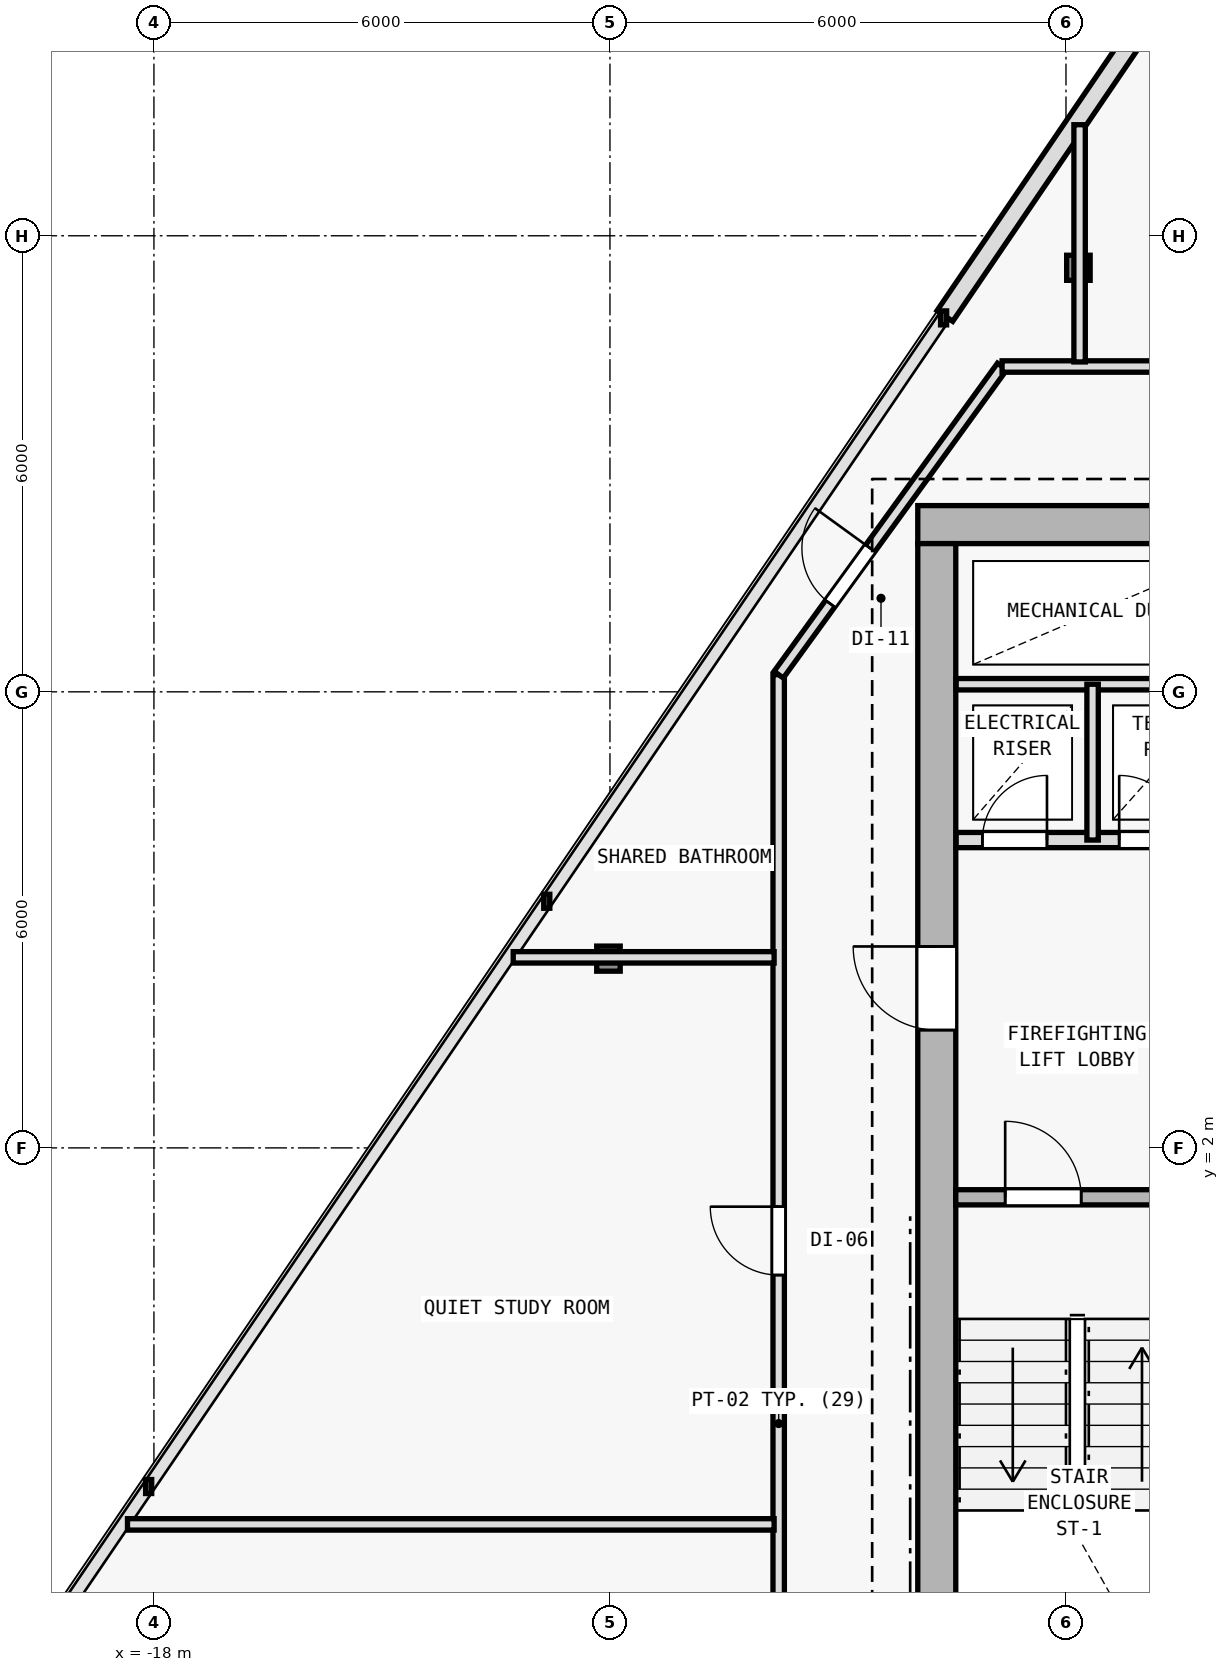
"""IFC4 building model, lengths in metres.
Left out: names, types, materials, properties, quantities, classifications, styles, units other than length and angle.
Written with IfcOpenShell. Run it as: python <this file> out.ifc"""

import sys

from ifc_helpers import new_model, si_unit, direction, frame, frame_2d, origin, origin_2d, place, context, subcontext, project, spatial, rectangle, i_section, extrude, element, fill, save


model = new_model("IFC4")
c1 = context("Model", 3, precision=1e-05, world=origin(), true_north=direction((0.0, 1.0)))
c2 = subcontext(c1, "Body", "Model", "MODEL_VIEW")
j1 = project(units=[si_unit("LENGTHUNIT", "METRE"), si_unit("PLANEANGLEUNIT", "RADIAN")], contexts=[c1])
p1 = place(None, origin())
s1 = spatial("IfcSite", under=j1, at=p1, CompositionType="ELEMENT")
p2 = place(p1, origin())
s2 = spatial("IfcBuilding", under=s1, at=p2, CompositionType="ELEMENT")
p3 = place(p2, frame((0.0, 0.0, 279.6)))
s3 = spatial("IfcBuildingStorey", under=s2, at=p3, CompositionType="ELEMENT", Elevation=279.6)
for number, where, z_axis, x_axis in (
    (1, (-7.7, 10.2, 0.0), (0.0, 0.0, 1.0), (1.0, 0.0, 0.0)),
    (2, (-7.7, 2.0, 0.0), (0.0, 0.0, 1.0), (1.0, 0.0, 0.0)),
):
    element("IfcColumn", number, at=place(p3, frame(where, z_axis=z_axis, x_axis=x_axis)), inside=s3, PredefinedType="COLUMN", context=c2, shape_type="SweptSolid", body=[
        extrude(i_section(OverallWidth=0.374, OverallDepth=0.372, WebThickness=0.012, FlangeThickness=0.02, FilletRadius=0.015, at=origin_2d()), origin(), (0.0, 0.0, 1.0), 3.6),
    ])
p4 = place(p3, frame((-5.837, 13.579, 0.005), z_axis=(0.008774546149, -0.002584750028, 0.999958162328), x_axis=(0.282568886397, 0.959247009086, 0.0)))
e3 = element("IfcColumn", 3, at=p4, inside=s3, PredefinedType="COLUMN", context=c2, shape_type="SweptSolid", body=[
    extrude(i_section(OverallWidth=0.309, OverallDepth=0.33, WebThickness=0.011, FlangeThickness=0.019, FilletRadius=0.027, at=origin_2d()), origin(), (0.0, 0.0, 1.0), 3.589),
])
p5 = place(p3, frame((-12.02, 4.49, 0.005), z_axis=(0.017070406608, 0.009521342331, 0.99980895438), x_axis=(-0.487119351792, 0.873335409284, 0.0)))
e4 = element("IfcColumn", 4, at=p5, inside=s3, PredefinedType="COLUMN", context=c2, shape_type="SweptSolid", body=[
    extrude(i_section(OverallWidth=0.309, OverallDepth=0.33, WebThickness=0.011, FlangeThickness=0.019, FilletRadius=0.027, at=origin_2d()), origin(), (0.0, 0.0, 1.0), 3.59),
])
p6 = place(p3, frame((-7.593, 12.945, 0.0), z_axis=(0.0, 0.0, 1.0), x_axis=(0.562476003565, 0.826813609838, 0.0)))
e5 = element("IfcWall", 5, at=p6, inside=s3, PredefinedType="SOLIDWALL", context=c2, shape_type="SweptSolid", body=[
    extrude(rectangle(XDim=9.816, YDim=0.25, at=frame_2d((4.908, 0.0))), origin(), (0.0, 0.0, 1.0), 3.35),
])
p7 = place(p6, frame((4.358, 0.0, 0.62)))
e6 = element("IfcOpeningElement", 6, at=p7, cuts=e5, PredefinedType="OPENING", context=c2, shape_type="SweptSolid", body=[
    extrude(rectangle(XDim=1.1, YDim=1.8, at=frame_2d((0.55, 0.9))), frame((0.0, 0.135, 0.0), z_axis=(0.0, -1.0, 0.0), x_axis=(1.0, 0.0, 0.0)), (0.0, 0.0, 1.0), 0.27),
])
p8 = place(p3, frame((7.95, 10.2, 0.0), z_axis=(0.0, 0.0, 1.0), x_axis=(-1.0, 0.0, 0.0)))
e7 = element("IfcWall", 7, at=p8, inside=s3, PredefinedType="SHEAR", context=c2, shape_type="SweptSolid", body=[
    extrude(rectangle(XDim=15.9, YDim=0.5, at=frame_2d((7.95, 0.0))), origin(), (0.0, 0.0, 1.0), 3.35),
])
p9 = place(p8, frame((4.4, 0.0, 0.0)))
e8 = element("IfcOpeningElement", 8, at=p9, cuts=e7, PredefinedType="OPENING", context=c2, shape_type="SweptSolid", body=[
    extrude(rectangle(XDim=1.1, YDim=2.15, at=frame_2d((0.55, 1.075))), frame((0.0, 0.26, 0.0), z_axis=(0.0, -1.0, 0.0), x_axis=(1.0, 0.0, 0.0)), (0.0, 0.0, 1.0), 0.52),
])
p10 = place(p3, frame((-7.7, -9.15, 0.0), z_axis=(0.0, 0.0, 1.0), x_axis=(0.0, 1.0, 0.0)))
e9 = element("IfcWall", 9, at=p10, inside=s3, PredefinedType="SHEAR", context=c2, shape_type="SweptSolid", body=[
    extrude(rectangle(XDim=19.1, YDim=0.5, at=frame_2d((9.55, 0.0))), origin(), (0.0, 0.0, 1.0), 3.35),
])
p11 = place(p10, frame((12.7, 0.0, 0.0)))
e10 = element("IfcOpeningElement", 10, at=p11, cuts=e9, PredefinedType="OPENING", context=c2, shape_type="SweptSolid", body=[
    extrude(rectangle(XDim=1.1, YDim=2.15, at=frame_2d((0.55, 1.075))), frame((0.0, 0.26, 0.0), z_axis=(0.0, -1.0, 0.0), x_axis=(1.0, 0.0, 0.0)), (0.0, 0.0, 1.0), 0.52),
])
p12 = place(p3, frame((-7.45, 1.35, 0.0), z_axis=(0.0, 0.0, 1.0), x_axis=(1.0, 0.0, 0.0)))
e11 = element("IfcWall", 11, at=p12, inside=s3, PredefinedType="SOLIDWALL", context=c2, shape_type="SweptSolid", body=[
    extrude(rectangle(XDim=3.4, YDim=0.2, at=frame_2d((1.7, 0.0))), origin(), (0.0, 0.0, 1.0), 3.35),
])
p13 = place(p12, frame((0.65, 0.0, 0.0)))
e12 = element("IfcOpeningElement", 12, at=p13, cuts=e11, PredefinedType="OPENING", context=c2, shape_type="SweptSolid", body=[
    extrude(rectangle(XDim=1.0, YDim=2.15, at=frame_2d((0.5, 1.075))), frame((0.0, 0.11, 0.0), z_axis=(0.0, -1.0, 0.0), x_axis=(1.0, 0.0, 0.0)), (0.0, 0.0, 1.0), 0.22),
])
p14 = place(p3, frame((-7.445, 6.05, 0.0), z_axis=(0.0, 0.0, 1.0), x_axis=(1.0, 0.0, 0.0)))
e13 = element("IfcWall", 13, at=p14, inside=s3, PredefinedType="SOLIDWALL", context=c2, shape_type="SweptSolid", body=[
    extrude(rectangle(XDim=3.595, YDim=0.2, at=frame_2d((1.797, 0.0))), origin(), (0.0, 0.0, 1.0), 3.35),
])
p15 = place(p14, frame((0.345, 0.0, 0.0)))
e14 = element("IfcOpeningElement", 14, at=p15, cuts=e13, PredefinedType="OPENING", context=c2, shape_type="SweptSolid", body=[
    extrude(rectangle(XDim=0.85, YDim=2.1, at=frame_2d((0.425, 1.05))), frame((0.0, 0.11, 0.0), z_axis=(0.0, -1.0, 0.0), x_axis=(1.0, 0.0, 0.0)), (0.0, 0.0, 1.0), 0.22),
])
p16 = place(p14, frame((2.145, 0.0, 0.0)))
e15 = element("IfcOpeningElement", 15, at=p16, cuts=e13, PredefinedType="OPENING", context=c2, shape_type="SweptSolid", body=[
    extrude(rectangle(XDim=0.85, YDim=2.1, at=frame_2d((0.425, 1.05))), frame((0.0, 0.11, 0.0), z_axis=(0.0, -1.0, 0.0), x_axis=(1.0, 0.0, 0.0)), (0.0, 0.0, 1.0), 0.22),
])
p17 = place(p3, frame((-7.445, 8.1, 0.0), z_axis=(0.0, 0.0, 1.0), x_axis=(1.0, 0.0, 0.0)))
e16 = element("IfcWall", 16, at=p17, inside=s3, PredefinedType="PARTITIONING", context=c2, shape_type="SweptSolid", body=[
    extrude(rectangle(XDim=3.595, YDim=0.15, at=frame_2d((1.797, 0.0))), origin(), (0.0, 0.0, 1.0), 3.35),
])
p18 = place(p3, frame((-5.65, 6.05, 0.0), z_axis=(0.0, 0.0, 1.0), x_axis=(0.0, 1.0, 0.0)))
e17 = element("IfcWall", 17, at=p18, inside=s3, PredefinedType="PARTITIONING", context=c2, shape_type="SweptSolid", body=[
    extrude(rectangle(XDim=2.05, YDim=0.15, at=frame_2d((1.025, 0.0))), origin(), (0.0, 0.0, 1.0), 3.35),
])
p19 = place(p3, frame((-9.78, -11.48, 0.0), z_axis=(0.0, 0.0, 1.0), x_axis=(0.0, 1.0, 0.0)))
e18 = element("IfcWall", 18, at=p19, inside=s3, PredefinedType="PARTITIONING", context=c2, shape_type="SweptSolid", body=[
    extrude(rectangle(XDim=19.706, YDim=0.15, at=frame_2d((9.853, 0.0))), origin(), (0.0, 0.0, 1.0), 2.825),
])
p20 = place(p19, frame((11.807, 0.0, 0.0)))
e19 = element("IfcOpeningElement", 19, at=p20, cuts=e18, PredefinedType="OPENING", context=c2, shape_type="SweptSolid", body=[
    extrude(rectangle(XDim=0.9, YDim=2.1, at=frame_2d((0.45, 1.05))), frame((0.0, 0.085, 0.0), z_axis=(0.0, -1.0, 0.0), x_axis=(1.0, 0.0, 0.0)), (0.0, 0.0, 1.0), 0.17),
])
p21 = place(p19, frame((3.903, 0.0, 0.0)))
e20 = element("IfcOpeningElement", 20, at=p21, cuts=e18, PredefinedType="OPENING", context=c2, shape_type="SweptSolid", body=[
    extrude(rectangle(XDim=0.9, YDim=2.1, at=frame_2d((0.45, 1.05))), frame((0.0, 0.085, 0.0), z_axis=(0.0, -1.0, 0.0), x_axis=(1.0, 0.0, 0.0)), (0.0, 0.0, 1.0), 0.17),
])
p22 = place(p3, frame((-9.78, 8.226, 0.0), z_axis=(0.0, 0.0, 1.0), x_axis=(0.586956386413, 0.809618552436, 0.0)))
e21 = element("IfcWall", 21, at=p22, inside=s3, PredefinedType="PARTITIONING", context=c2, shape_type="SweptSolid", body=[
    extrude(rectangle(XDim=5.008, YDim=0.15, at=frame_2d((2.504, 0.0))), origin(), (0.0, 0.0, 1.0), 3.015),
])
p23 = place(p22, frame((1.154, 0.0, 0.0)))
e22 = element("IfcOpeningElement", 22, at=p23, cuts=e21, PredefinedType="OPENING", context=c2, shape_type="SweptSolid", body=[
    extrude(rectangle(XDim=0.9, YDim=2.1, at=frame_2d((0.45, 1.05))), frame((0.0, 0.085, 0.0), z_axis=(0.0, -1.0, 0.0), x_axis=(1.0, 0.0, 0.0)), (0.0, 0.0, 1.0), 0.17),
])
p24 = place(p3, frame((-6.841, 12.28, 0.0), z_axis=(0.0, 0.0, 1.0), x_axis=(1.0, 0.0, 0.0)))
e23 = element("IfcWall", 23, at=p24, inside=s3, PredefinedType="PARTITIONING", context=c2, shape_type="SweptSolid", body=[
    extrude(rectangle(XDim=13.682, YDim=0.15, at=frame_2d((6.841, 0.0))), origin(), (0.0, 0.0, 1.0), 3.015),
])
p25 = place(p24, frame((10.935, 0.0, 0.0)))
e24 = element("IfcOpeningElement", 24, at=p25, cuts=e23, PredefinedType="OPENING", context=c2, shape_type="SweptSolid", body=[
    extrude(rectangle(XDim=0.9, YDim=2.1, at=frame_2d((0.45, 1.05))), frame((0.0, 0.085, 0.0), z_axis=(0.0, -1.0, 0.0), x_axis=(1.0, 0.0, 0.0)), (0.0, 0.0, 1.0), 0.17),
])
p26 = place(p24, frame((4.693, 0.0, 0.0)))
e25 = element("IfcOpeningElement", 25, at=p26, cuts=e23, PredefinedType="OPENING", context=c2, shape_type="SweptSolid", body=[
    extrude(rectangle(XDim=0.9, YDim=2.1, at=frame_2d((0.45, 1.05))), frame((0.0, 0.085, 0.0), z_axis=(0.0, -1.0, 0.0), x_axis=(1.0, 0.0, 0.0)), (0.0, 0.0, 1.0), 0.17),
])
p27 = place(p3, frame((-5.821, 12.34, 0.0), z_axis=(0.0, 0.0, 1.0), x_axis=(0.0, 1.0, 0.0)))
e26 = element("IfcWall", 26, at=p27, inside=s3, PredefinedType="PARTITIONING", context=c2, shape_type="SweptSolid", body=[
    extrude(rectangle(XDim=3.121, YDim=0.15, at=frame_2d((1.561, 0.0))), origin(), (0.0, 0.0, 1.0), 3.015),
])
p28 = place(p3, frame((-9.84, 4.507, 0.0), z_axis=(0.0, 0.0, 1.0), x_axis=(-1.0, 0.0, 0.0)))
e27 = element("IfcWall", 27, at=p28, inside=s3, PredefinedType="PARTITIONING", context=c2, shape_type="SweptSolid", body=[
    extrude(rectangle(XDim=3.433, YDim=0.15, at=frame_2d((1.716, 0.0))), origin(), (0.0, 0.0, 1.0), 3.015),
])
p29 = place(p3, frame((-9.84, -2.953, 0.0), z_axis=(0.0, 0.0, 1.0), x_axis=(-1.0, 0.0, 0.0)))
e28 = element("IfcWall", 28, at=p29, inside=s3, PredefinedType="PARTITIONING", context=c2, shape_type="SweptSolid", body=[
    extrude(rectangle(XDim=8.508, YDim=0.15, at=frame_2d((4.254, 0.0))), origin(), (0.0, 0.0, 1.0), 2.875),
])
p30 = place(p11, origin())
e29 = element("IfcDoor", 29, at=p30, inside=s3, OperationType="SINGLE_SWING_RIGHT", PredefinedType="DOOR", context=c2, shape_type="SweptSolid", body=[
    extrude(rectangle(XDim=1.1, YDim=2.15, at=frame_2d((0.55, 1.075))), frame((0.0, 0.025, 0.0), z_axis=(0.0, -1.0, 0.0), x_axis=(1.0, 0.0, 0.0)), (0.0, 0.0, 1.0), 0.05),
])
fill(e10, e29)
p31 = place(p13, origin())
e30 = element("IfcDoor", 30, at=p31, inside=s3, OperationType="SINGLE_SWING_LEFT", PredefinedType="DOOR", context=c2, shape_type="SweptSolid", body=[
    extrude(rectangle(XDim=1.0, YDim=2.15, at=frame_2d((0.5, 1.075))), frame((0.0, 0.025, 0.0), z_axis=(0.0, -1.0, 0.0), x_axis=(1.0, 0.0, 0.0)), (0.0, 0.0, 1.0), 0.05),
])
fill(e12, e30)
p32 = place(p15, origin())
e31 = element("IfcDoor", 31, at=p32, inside=s3, OperationType="SINGLE_SWING_RIGHT", PredefinedType="DOOR", context=c2, shape_type="SweptSolid", body=[
    extrude(rectangle(XDim=0.85, YDim=2.1, at=frame_2d((0.425, 1.05))), frame((0.0, 0.025, 0.0), z_axis=(0.0, -1.0, 0.0), x_axis=(1.0, 0.0, 0.0)), (0.0, 0.0, 1.0), 0.05),
])
fill(e14, e31)
p33 = place(p16, origin())
e32 = element("IfcDoor", 32, at=p33, inside=s3, OperationType="SINGLE_SWING_LEFT", PredefinedType="DOOR", context=c2, shape_type="SweptSolid", body=[
    extrude(rectangle(XDim=0.85, YDim=2.1, at=frame_2d((0.425, 1.05))), frame((0.0, 0.025, 0.0), z_axis=(0.0, -1.0, 0.0), x_axis=(1.0, 0.0, 0.0)), (0.0, 0.0, 1.0), 0.05),
])
fill(e15, e32)
p34 = place(p20, origin())
e33 = element("IfcDoor", 33, at=p34, inside=s3, OperationType="SINGLE_SWING_RIGHT", PredefinedType="DOOR", context=c2, shape_type="SweptSolid", body=[
    extrude(rectangle(XDim=0.9, YDim=2.1, at=frame_2d((0.45, 1.05))), frame((0.0, 0.025, 0.0), z_axis=(0.0, -1.0, 0.0), x_axis=(1.0, 0.0, 0.0)), (0.0, 0.0, 1.0), 0.05),
])
fill(e19, e33)
p35 = place(p23, origin())
e34 = element("IfcDoor", 34, at=p35, inside=s3, OperationType="SINGLE_SWING_RIGHT", PredefinedType="DOOR", context=c2, shape_type="SweptSolid", body=[
    extrude(rectangle(XDim=0.9, YDim=2.1, at=frame_2d((0.45, 1.05))), frame((0.0, 0.025, 0.0), z_axis=(0.0, -1.0, 0.0), x_axis=(1.0, 0.0, 0.0)), (0.0, 0.0, 1.0), 0.05),
])
fill(e22, e34)
save(model, sys.argv[1])
